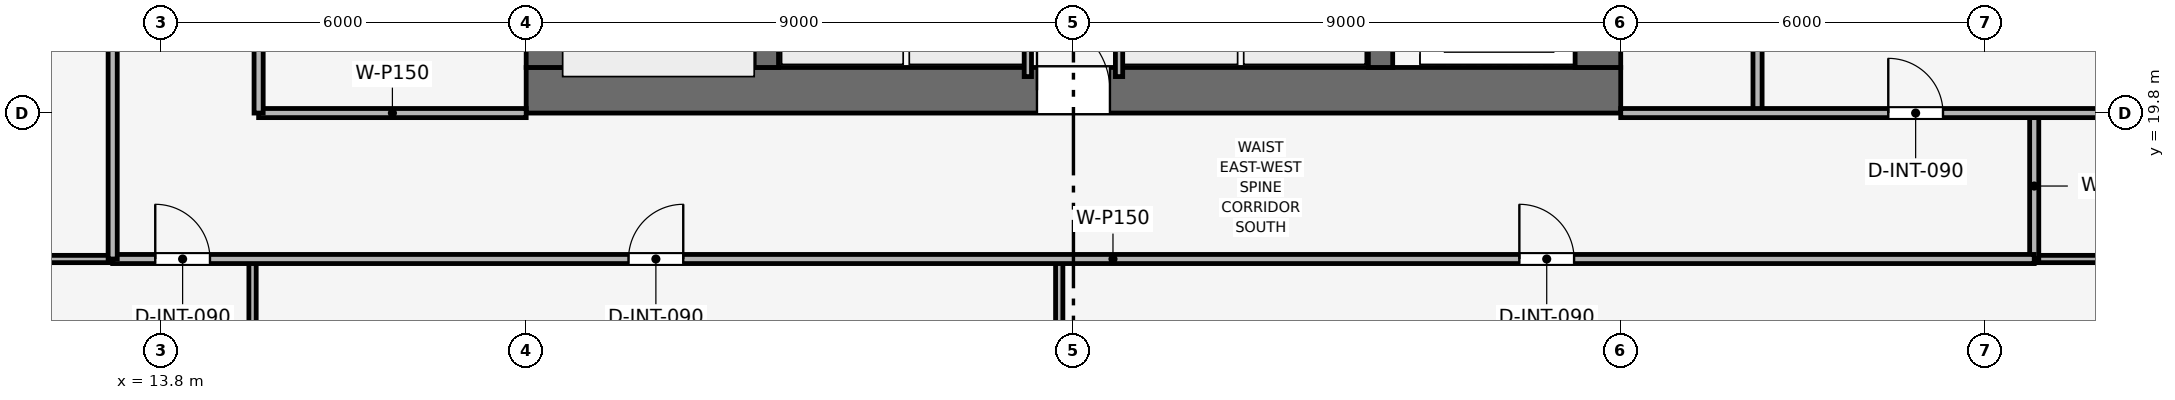
"""IFC4 building model, lengths in metres.
Left out: names, types, materials, properties, quantities, classifications, styles, units other than length and angle.
Written with IfcOpenShell. Run it as: python <this file> out.ifc"""

import sys

from ifc_helpers import new_model, si_unit, direction, frame, frame_2d, origin, place, context, subcontext, project, spatial, rectangle, extrude, element, fill, save


model = new_model("IFC4")
c1 = context("Model", 3, precision=1e-05, world=origin(), true_north=direction((0.0, 1.0)))
c2 = subcontext(c1, "Body", "Model", "MODEL_VIEW")
j1 = project(units=[si_unit("LENGTHUNIT", "METRE"), si_unit("PLANEANGLEUNIT", "RADIAN")], contexts=[c1])
p1 = place(None, origin())
s1 = spatial("IfcSite", under=j1, at=p1, CompositionType="ELEMENT")
p2 = place(p1, origin())
s2 = spatial("IfcBuilding", under=s1, at=p2, CompositionType="ELEMENT")
p3 = place(p2, frame((0.0, 0.0, 226.2)))
s3 = spatial("IfcBuildingStorey", under=s2, at=p3, CompositionType="ELEMENT", Elevation=226.2)
p4 = place(p3, frame((19.8, 20.175, 0.0), z_axis=(0.0, 0.0, 1.0), x_axis=(1.0, 0.0, 0.0)))
e1 = element("IfcWall", 1, at=p4, inside=s3, PredefinedType="SHEAR", context=c2, shape_type="SweptSolid", body=[
    extrude(rectangle(XDim=18.0, YDim=0.75, at=frame_2d((9.0, 0.0))), origin(), (0.0, 0.0, 1.0), 3.75),
])
p5 = place(p4, frame((8.4, 0.0, 0.0)))
e2 = element("IfcOpeningElement", 2, at=p5, cuts=e1, PredefinedType="OPENING", context=c2, shape_type="SweptSolid", body=[
    extrude(rectangle(XDim=1.2, YDim=2.2, at=frame_2d((0.6, 1.1))), frame((0.0, 0.385, 0.0), z_axis=(0.0, -1.0, 0.0), x_axis=(1.0, 0.0, 0.0)), (0.0, 0.0, 1.0), 0.77),
])
p6 = place(p3, frame((20.175, 20.55, 0.0), z_axis=(0.0, 0.0, 1.0), x_axis=(0.0, 1.0, 0.0)))
e3 = element("IfcWall", 3, at=p6, inside=s3, PredefinedType="SHEAR", context=c2, shape_type="SweptSolid", body=[
    extrude(rectangle(XDim=16.5, YDim=0.75, at=frame_2d((8.25, 0.0))), origin(), (0.0, 0.0, 1.0), 3.75),
])
p7 = place(p6, frame((10.25, 0.0, 0.0)))
e4 = element("IfcOpeningElement", 4, at=p7, cuts=e3, PredefinedType="OPENING", context=c2, shape_type="SweptSolid", body=[
    extrude(rectangle(XDim=1.1, YDim=2.15, at=frame_2d((0.55, 1.075))), frame((0.0, 0.385, 0.0), z_axis=(0.0, -1.0, 0.0), x_axis=(1.0, 0.0, 0.0)), (0.0, 0.0, 1.0), 0.77),
])
p8 = place(p3, frame((37.425, 20.55, 0.0), z_axis=(0.0, 0.0, 1.0), x_axis=(0.0, 1.0, 0.0)))
e5 = element("IfcWall", 5, at=p8, inside=s3, PredefinedType="SHEAR", context=c2, shape_type="SweptSolid", body=[
    extrude(rectangle(XDim=16.5, YDim=0.75, at=frame_2d((8.25, 0.0))), origin(), (0.0, 0.0, 1.0), 3.75),
])
p9 = place(p8, frame((4.75, 0.0, 0.0)))
e6 = element("IfcOpeningElement", 6, at=p9, cuts=e5, PredefinedType="OPENING", context=c2, shape_type="SweptSolid", body=[
    extrude(rectangle(XDim=1.1, YDim=2.15, at=frame_2d((0.55, 1.075))), frame((0.0, 0.385, 0.0), z_axis=(0.0, -1.0, 0.0), x_axis=(1.0, 0.0, 0.0)), (0.0, 0.0, 1.0), 0.77),
])
for number, where, z_axis, x_axis in (
    (7, (23.75, 20.55, 0.0), (0.0, 0.0, 1.0), (0.0, 1.0, 0.0)),
    (8, (33.85, 20.55, 0.0), (0.0, 0.0, 1.0), (0.0, 1.0, 0.0)),
):
    element("IfcWall", number, at=place(p3, frame(where, z_axis=z_axis, x_axis=x_axis)), inside=s3, PredefinedType="SHEAR", context=c2, shape_type="SweptSolid", body=[
        extrude(rectangle(XDim=16.5, YDim=0.4, at=frame_2d((8.25, 0.0))), origin(), (0.0, 0.0, 1.0), 3.75),
    ])
for number, where, z_axis, x_axis in (
    (9, (28.05, 20.4, 0.0), (0.0, 0.0, 1.0), (0.0, 1.0, 0.0)),
    (10, (29.55, 20.4, 0.0), (0.0, 0.0, 1.0), (0.0, 1.0, 0.0)),
):
    element("IfcWall", number, at=place(p3, frame(where, z_axis=z_axis, x_axis=x_axis)), inside=s3, PredefinedType="PARTITIONING", context=c2, shape_type="SweptSolid", body=[
        extrude(rectangle(XDim=2.75, YDim=0.12, at=frame_2d((1.375, 0.0))), origin(), (0.0, 0.0, 1.0), 3.5),
    ])
p10 = place(p3, frame((15.4, 19.8, 0.0), z_axis=(0.0, 0.0, 1.0), x_axis=(1.0, 0.0, 0.0)))
e11 = element("IfcWall", 11, at=p10, inside=s3, PredefinedType="PARTITIONING", context=c2, shape_type="SweptSolid", body=[
    extrude(rectangle(XDim=4.4, YDim=0.15, at=frame_2d((2.2, 0.0))), origin(), (0.0, 0.0, 1.0), 3.035),
])
p11 = place(p3, frame((15.4, 19.8, 0.0), z_axis=(0.0, 0.0, 1.0), x_axis=(0.0, 1.0, 0.0)))
e12 = element("IfcWall", 12, at=p11, inside=s3, PredefinedType="PARTITIONING", context=c2, shape_type="SweptSolid", body=[
    extrude(rectangle(XDim=10.35, YDim=0.15, at=frame_2d((5.175, 0.0))), origin(), (0.0, 0.0, 1.0), 3.035),
])
p12 = place(p11, frame((1.2, 0.0, 0.0)))
e13 = element("IfcOpeningElement", 13, at=p12, cuts=e12, PredefinedType="OPENING", context=c2, shape_type="SweptSolid", body=[
    extrude(rectangle(XDim=0.9, YDim=2.1, at=frame_2d((0.45, 1.05))), frame((0.0, 0.085, 0.0), z_axis=(0.0, -1.0, 0.0), x_axis=(1.0, 0.0, 0.0)), (0.0, 0.0, 1.0), 0.17),
])
p13 = place(p11, frame((4.7, 0.0, 0.0)))
e14 = element("IfcOpeningElement", 14, at=p13, cuts=e12, PredefinedType="OPENING", context=c2, shape_type="SweptSolid", body=[
    extrude(rectangle(XDim=0.9, YDim=2.1, at=frame_2d((0.45, 1.05))), frame((0.0, 0.085, 0.0), z_axis=(0.0, -1.0, 0.0), x_axis=(1.0, 0.0, 0.0)), (0.0, 0.0, 1.0), 0.17),
])
p14 = place(p11, frame((8.1, 0.0, 0.0)))
e15 = element("IfcOpeningElement", 15, at=p14, cuts=e12, PredefinedType="OPENING", context=c2, shape_type="SweptSolid", body=[
    extrude(rectangle(XDim=0.95, YDim=2.1, at=frame_2d((0.475, 1.05))), frame((0.0, 0.085, 0.0), z_axis=(0.0, -1.0, 0.0), x_axis=(1.0, 0.0, 0.0)), (0.0, 0.0, 1.0), 0.17),
])
p15 = place(p3, frame((40.05, 19.8, 0.0), z_axis=(0.0, 0.0, 1.0), x_axis=(0.0, 1.0, 0.0)))
e16 = element("IfcWall", 16, at=p15, inside=s3, PredefinedType="PARTITIONING", context=c2, shape_type="SweptSolid", body=[
    extrude(rectangle(XDim=7.05, YDim=0.15, at=frame_2d((3.525, 0.0))), origin(), (0.0, 0.0, 1.0), 3.035),
])
for number, where, z_axis, x_axis in (
    (17, (15.3, 1.93, 0.0), (0.0, 0.0, 1.0), (0.0, 1.0, 0.0)),
    (18, (28.566, 1.93, 0.0), (0.0, 0.0, 1.0), (0.0, 1.0, 0.0)),
):
    element("IfcWall", number, at=place(p3, frame(where, z_axis=z_axis, x_axis=x_axis)), inside=s3, PredefinedType="PARTITIONING", context=c2, shape_type="SweptSolid", body=[
        extrude(rectangle(XDim=15.47, YDim=0.12, at=frame_2d((7.735, 0.0))), origin(), (0.0, 0.0, 1.0), 2.885),
    ])
p16 = place(p3, frame((1.93, 17.4, 0.0), z_axis=(0.0, 0.0, 1.0), x_axis=(1.0, 0.0, 0.0)))
e19 = element("IfcWall", 19, at=p16, inside=s3, PredefinedType="PARTITIONING", context=c2, shape_type="SweptSolid", body=[
    extrude(rectangle(XDim=11.07, YDim=0.12, at=frame_2d((5.535, 0.0))), origin(), (0.0, 0.0, 1.0), 2.885),
])
p17 = place(p3, frame((44.6, 17.4, 0.0), z_axis=(0.0, 0.0, 1.0), x_axis=(1.0, 0.0, 0.0)))
e20 = element("IfcWall", 20, at=p17, inside=s3, PredefinedType="PARTITIONING", context=c2, shape_type="SweptSolid", body=[
    extrude(rectangle(XDim=11.07, YDim=0.12, at=frame_2d((5.535, 0.0))), origin(), (0.0, 0.0, 1.0), 2.885),
])
p18 = place(p3, frame((44.6, 17.4, 0.0), z_axis=(0.0, 0.0, 1.0), x_axis=(0.0, 1.0, 0.0)))
e21 = element("IfcWall", 21, at=p18, inside=s3, PredefinedType="PARTITIONING", context=c2, shape_type="SweptSolid", body=[
    extrude(rectangle(XDim=2.4, YDim=0.15, at=frame_2d((1.2, 0.0))), origin(), (0.0, 0.0, 1.0), 3.5),
])
p19 = place(p3, frame((37.8, 19.8, 0.0), z_axis=(0.0, 0.0, 1.0), x_axis=(1.0, 0.0, 0.0)))
e22 = element("IfcWall", 22, at=p19, inside=s3, PredefinedType="PARTITIONING", context=c2, shape_type="SweptSolid", body=[
    extrude(rectangle(XDim=17.87, YDim=0.15, at=frame_2d((8.935, 0.0))), origin(), (0.0, 0.0, 1.0), 2.885),
])
p20 = place(p19, frame((4.4, 0.0, 0.0)))
e23 = element("IfcOpeningElement", 23, at=p20, cuts=e22, PredefinedType="OPENING", context=c2, shape_type="SweptSolid", body=[
    extrude(rectangle(XDim=0.9, YDim=2.1, at=frame_2d((0.45, 1.05))), frame((0.0, 0.085, 0.0), z_axis=(0.0, -1.0, 0.0), x_axis=(1.0, 0.0, 0.0)), (0.0, 0.0, 1.0), 0.17),
])
p21 = place(p3, frame((13.0, 17.4, 0.0), z_axis=(0.0, 0.0, 1.0), x_axis=(1.0, 0.0, 0.0)))
e24 = element("IfcWall", 24, at=p21, inside=s3, PredefinedType="PARTITIONING", context=c2, shape_type="SweptSolid", body=[
    extrude(rectangle(XDim=31.6, YDim=0.15, at=frame_2d((15.8, 0.0))), origin(), (0.0, 0.0, 1.0), 3.035),
])
p22 = place(p21, frame((0.7, 0.0, 0.0)))
e25 = element("IfcOpeningElement", 25, at=p22, cuts=e24, PredefinedType="OPENING", context=c2, shape_type="SweptSolid", body=[
    extrude(rectangle(XDim=0.9, YDim=2.1, at=frame_2d((0.45, 1.05))), frame((0.0, 0.085, 0.0), z_axis=(0.0, -1.0, 0.0), x_axis=(1.0, 0.0, 0.0)), (0.0, 0.0, 1.0), 0.17),
])
p23 = place(p21, frame((8.483, 0.0, 0.0)))
e26 = element("IfcOpeningElement", 26, at=p23, cuts=e24, PredefinedType="OPENING", context=c2, shape_type="SweptSolid", body=[
    extrude(rectangle(XDim=0.9, YDim=2.1, at=frame_2d((0.45, 1.05))), frame((0.0, 0.085, 0.0), z_axis=(0.0, -1.0, 0.0), x_axis=(1.0, 0.0, 0.0)), (0.0, 0.0, 1.0), 0.17),
])
p24 = place(p21, frame((23.133, 0.0, 0.0)))
e27 = element("IfcOpeningElement", 27, at=p24, cuts=e24, PredefinedType="OPENING", context=c2, shape_type="SweptSolid", body=[
    extrude(rectangle(XDim=0.9, YDim=2.1, at=frame_2d((0.45, 1.05))), frame((0.0, 0.085, 0.0), z_axis=(0.0, -1.0, 0.0), x_axis=(1.0, 0.0, 0.0)), (0.0, 0.0, 1.0), 0.17),
])
p25 = place(p3, frame((13.0, 17.4, 0.0), z_axis=(0.0, 0.0, 1.0), x_axis=(0.0, 1.0, 0.0)))
e28 = element("IfcWall", 28, at=p25, inside=s3, PredefinedType="PARTITIONING", context=c2, shape_type="SweptSolid", body=[
    extrude(rectangle(XDim=22.8, YDim=0.15, at=frame_2d((11.4, 0.0))), origin(), (0.0, 0.0, 1.0), 3.035),
])
p26 = place(p25, frame((10.95, 0.0, 0.0)))
e29 = element("IfcOpeningElement", 29, at=p26, cuts=e28, PredefinedType="OPENING", context=c2, shape_type="SweptSolid", body=[
    extrude(rectangle(XDim=0.9, YDim=2.1, at=frame_2d((0.45, 1.05))), frame((0.0, 0.085, 0.0), z_axis=(0.0, -1.0, 0.0), x_axis=(1.0, 0.0, 0.0)), (0.0, 0.0, 1.0), 0.17),
])
p27 = place(p20, origin())
e30 = element("IfcDoor", 30, at=p27, inside=s3, OperationType="SINGLE_SWING_LEFT", PredefinedType="DOOR", context=c2, shape_type="SweptSolid", body=[
    extrude(rectangle(XDim=0.9, YDim=2.1, at=frame_2d((0.45, 1.05))), frame((0.0, 0.025, 0.0), z_axis=(0.0, -1.0, 0.0), x_axis=(1.0, 0.0, 0.0)), (0.0, 0.0, 1.0), 0.05),
])
fill(e23, e30)
p28 = place(p22, origin())
e31 = element("IfcDoor", 31, at=p28, inside=s3, OperationType="SINGLE_SWING_LEFT", PredefinedType="DOOR", context=c2, shape_type="SweptSolid", body=[
    extrude(rectangle(XDim=0.9, YDim=2.1, at=frame_2d((0.45, 1.05))), frame((0.0, 0.025, 0.0), z_axis=(0.0, -1.0, 0.0), x_axis=(1.0, 0.0, 0.0)), (0.0, 0.0, 1.0), 0.05),
])
fill(e25, e31)
p29 = place(p23, origin())
e32 = element("IfcDoor", 32, at=p29, inside=s3, OperationType="SINGLE_SWING_RIGHT", PredefinedType="DOOR", context=c2, shape_type="SweptSolid", body=[
    extrude(rectangle(XDim=0.9, YDim=2.1, at=frame_2d((0.45, 1.05))), frame((0.0, 0.025, 0.0), z_axis=(0.0, -1.0, 0.0), x_axis=(1.0, 0.0, 0.0)), (0.0, 0.0, 1.0), 0.05),
])
fill(e26, e32)
p30 = place(p24, origin())
e33 = element("IfcDoor", 33, at=p30, inside=s3, OperationType="SINGLE_SWING_LEFT", PredefinedType="DOOR", context=c2, shape_type="SweptSolid", body=[
    extrude(rectangle(XDim=0.9, YDim=2.1, at=frame_2d((0.45, 1.05))), frame((0.0, 0.025, 0.0), z_axis=(0.0, -1.0, 0.0), x_axis=(1.0, 0.0, 0.0)), (0.0, 0.0, 1.0), 0.05),
])
fill(e27, e33)
p31 = place(p5, origin())
e34 = element("IfcDoor", 34, at=p31, inside=s3, OperationType="SINGLE_SWING_LEFT", PredefinedType="DOOR", context=c2, shape_type="SweptSolid", body=[
    extrude(rectangle(XDim=1.2, YDim=2.2, at=frame_2d((0.6, 1.1))), frame((0.0, 0.025, 0.0), z_axis=(0.0, -1.0, 0.0), x_axis=(1.0, 0.0, 0.0)), (0.0, 0.0, 1.0), 0.05),
])
fill(e2, e34)
save(model, sys.argv[1])
